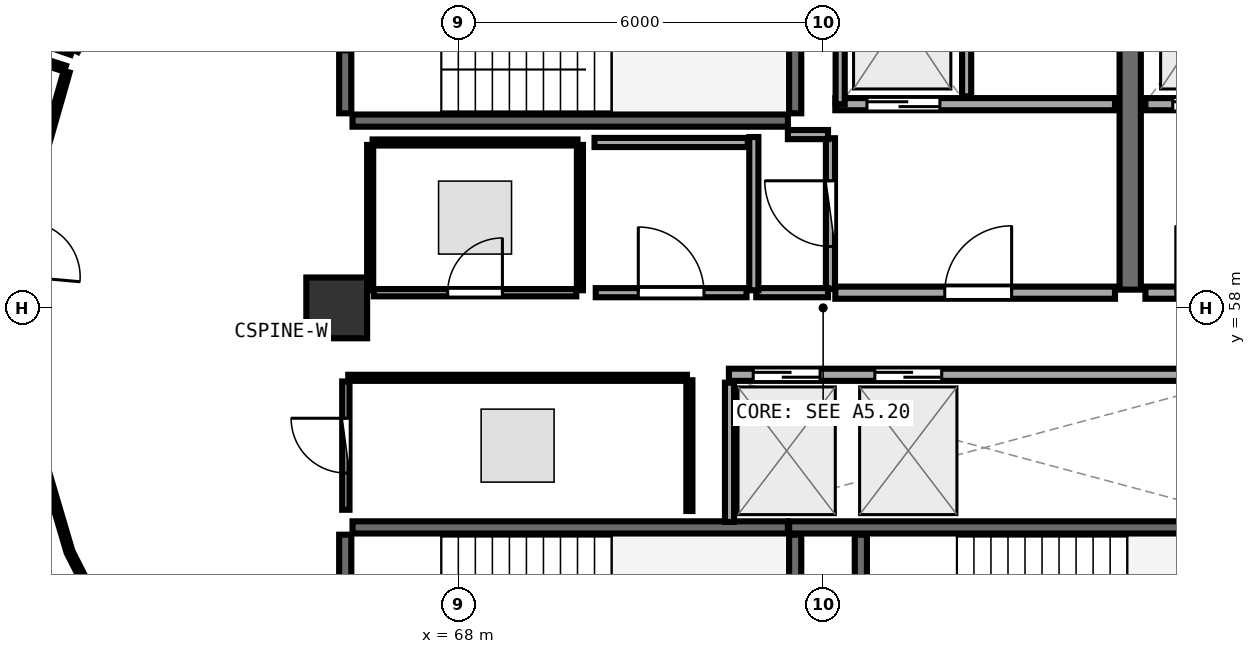
"""IFC4 building model, lengths in metres.
Left out: names, types, materials, properties, quantities, classifications, styles, units other than length and angle.
Written with IfcOpenShell. Run it as: python <this file> out.ifc"""

import sys

from ifc_helpers import new_model, si_unit, direction, frame, frame_2d, origin, origin_2d, place, context, subcontext, project, spatial, rectangle, extrude, element, fill, save


model = new_model("IFC4")
c1 = context("Model", 3, precision=1e-05, world=origin(), true_north=direction((0.0, 1.0)))
c2 = subcontext(c1, "Body", "Model", "MODEL_VIEW")
j1 = project(units=[si_unit("LENGTHUNIT", "METRE"), si_unit("PLANEANGLEUNIT", "RADIAN")], contexts=[c1])
p1 = place(None, origin())
s1 = spatial("IfcSite", under=j1, at=p1, CompositionType="ELEMENT")
p2 = place(p1, origin())
s2 = spatial("IfcBuilding", under=s1, at=p2, CompositionType="ELEMENT")
p3 = place(p2, frame((0.0, 0.0, 282.45)))
s3 = spatial("IfcBuildingStorey", under=s2, at=p3, CompositionType="ELEMENT", Elevation=282.45)
p4 = place(p3, frame((66.0, 58.0, 0.0), z_axis=(0.0, 0.0, 1.0), x_axis=(1.0, 0.0, 0.0)))
e1 = element("IfcColumn", 1, at=p4, inside=s3, PredefinedType="PILASTER", context=c2, shape_type="SweptSolid", body=[
    extrude(rectangle(XDim=1.0, YDim=1.0, at=origin_2d()), origin(), (0.0, 0.0, 1.0), 3.75),
])
p5 = place(p3, frame((66.26, 61.08, 0.0), z_axis=(0.0, 0.0, 1.0), x_axis=(1.0, 0.0, 0.0)))
e2 = element("IfcWall", 2, at=p5, inside=s3, PredefinedType="SHEAR", context=c2, shape_type="SweptSolid", body=[
    extrude(rectangle(XDim=7.16, YDim=0.2, at=frame_2d((3.58, 0.0))), origin(), (0.0, 0.0, 1.0), 3.49),
])
p6 = place(p3, frame((73.54, 61.2, 0.0), z_axis=(0.0, 0.0, 1.0), x_axis=(0.0, 1.0, 0.0)))
e3 = element("IfcWall", 3, at=p6, inside=s3, PredefinedType="SHEAR", context=c2, shape_type="SweptSolid", body=[
    extrude(rectangle(XDim=3.07, YDim=0.2, at=frame_2d((1.535, 0.0))), origin(), (0.0, 0.0, 1.0), 3.49),
])
p7 = place(p3, frame((66.14, 64.27, 0.0), z_axis=(0.0, 0.0, 1.0), x_axis=(0.0, -1.0, 0.0)))
e4 = element("IfcWall", 4, at=p7, inside=s3, PredefinedType="SHEAR", context=c2, shape_type="SweptSolid", body=[
    extrude(rectangle(XDim=3.07, YDim=0.2, at=frame_2d((1.535, 0.0))), origin(), (0.0, 0.0, 1.0), 3.49),
])
p8 = place(p7, frame((1.01, 0.0, 0.0)))
e5 = element("IfcOpeningElement", 5, at=p8, cuts=e4, PredefinedType="OPENING", context=c2, shape_type="SweptSolid", body=[
    extrude(rectangle(XDim=1.05, YDim=2.1, at=frame_2d((0.525, 1.05))), frame((0.0, 0.11, 0.0), z_axis=(0.0, -1.0, 0.0), x_axis=(1.0, 0.0, 0.0)), (0.0, 0.0, 1.0), 0.22),
])
p9 = place(p3, frame((81.9, 54.39, 0.0), z_axis=(0.0, 0.0, 1.0), x_axis=(-1.0, 0.0, 0.0)))
e6 = element("IfcWall", 6, at=p9, inside=s3, PredefinedType="SHEAR", context=c2, shape_type="SweptSolid", body=[
    extrude(rectangle(XDim=8.46, YDim=0.2, at=frame_2d((4.23, 0.0))), origin(), (0.0, 0.0, 1.0), 3.49),
])
for number, where, z_axis, x_axis in (
    (7, (74.62, 54.27, 0.0), (0.0, 0.0, 1.0), (0.0, -1.0, 0.0)),
    (8, (73.54, 51.2, 0.0), (0.0, 0.0, 1.0), (0.0, 1.0, 0.0)),
):
    element("IfcWall", number, at=place(p3, frame(where, z_axis=z_axis, x_axis=x_axis)), inside=s3, PredefinedType="SHEAR", context=c2, shape_type="SweptSolid", body=[
        extrude(rectangle(XDim=3.07, YDim=0.2, at=frame_2d((1.535, 0.0))), origin(), (0.0, 0.0, 1.0), 3.49),
    ])
p10 = place(p3, frame((73.42, 54.39, 0.0), z_axis=(0.0, 0.0, 1.0), x_axis=(-1.0, 0.0, 0.0)))
e9 = element("IfcWall", 9, at=p10, inside=s3, PredefinedType="SHEAR", context=c2, shape_type="SweptSolid", body=[
    extrude(rectangle(XDim=7.16, YDim=0.2, at=frame_2d((3.58, 0.0))), origin(), (0.0, 0.0, 1.0), 3.49),
])
p11 = place(p3, frame((66.14, 54.27, 0.0), z_axis=(0.0, 0.0, 1.0), x_axis=(0.0, -1.0, 0.0)))
e10 = element("IfcWall", 10, at=p11, inside=s3, PredefinedType="SHEAR", context=c2, shape_type="SweptSolid", body=[
    extrude(rectangle(XDim=3.07, YDim=0.2, at=frame_2d((1.535, 0.0))), origin(), (0.0, 0.0, 1.0), 3.49),
])
p12 = place(p11, frame((1.01, 0.0, 0.0)))
e11 = element("IfcOpeningElement", 11, at=p12, cuts=e10, PredefinedType="OPENING", context=c2, shape_type="SweptSolid", body=[
    extrude(rectangle(XDim=1.05, YDim=2.1, at=frame_2d((0.525, 1.05))), frame((0.0, 0.11, 0.0), z_axis=(0.0, -1.0, 0.0), x_axis=(1.0, 0.0, 0.0)), (0.0, 0.0, 1.0), 0.22),
])
p13 = place(p3, frame((79.05, 58.3, 0.0), z_axis=(0.0, 0.0, 1.0), x_axis=(0.0, 1.0, 0.0)))
e12 = element("IfcWall", 12, at=p13, inside=s3, PredefinedType="SHEAR", context=c2, shape_type="SweptSolid", body=[
    extrude(rectangle(XDim=6.3, YDim=0.35, at=frame_2d((3.15, 0.0))), origin(), (0.0, 0.0, 1.0), 3.49),
])
p14 = place(p3, frame((74.2, 61.35, 0.0), z_axis=(0.0, 0.0, 1.0), x_axis=(1.0, 0.0, 0.0)))
e13 = element("IfcWall", 13, at=p14, inside=s3, PredefinedType="SOLIDWALL", context=c2, shape_type="SweptSolid", body=[
    extrude(rectangle(XDim=4.6, YDim=0.2, at=frame_2d((2.3, 0.0))), origin(), (0.0, 0.0, 1.0), 3.48),
])
p15 = place(p14, frame((0.52, 0.0, 0.0)))
e14 = element("IfcOpeningElement", 14, at=p15, cuts=e13, PredefinedType="OPENING", context=c2, shape_type="SweptSolid", body=[
    extrude(rectangle(XDim=1.2, YDim=2.15, at=frame_2d((0.6, 1.075))), frame((0.0, 0.11, 0.0), z_axis=(0.0, -1.0, 0.0), x_axis=(1.0, 0.0, 0.0)), (0.0, 0.0, 1.0), 0.22),
])
p16 = place(p3, frame((74.28, 61.35, 0.0), z_axis=(0.0, 0.0, 1.0), x_axis=(0.0, 1.0, 0.0)))
e15 = element("IfcWall", 15, at=p16, inside=s3, PredefinedType="PARTITIONING", context=c2, shape_type="SweptSolid", body=[
    extrude(rectangle(XDim=2.97, YDim=0.15, at=frame_2d((1.485, 0.0))), origin(), (0.0, 0.0, 1.0), 3.48),
])
p17 = place(p3, frame((76.36, 61.48, 0.0), z_axis=(0.0, 0.0, 1.0), x_axis=(0.0, 1.0, 0.0)))
e16 = element("IfcWall", 16, at=p17, inside=s3, PredefinedType="PARTITIONING", context=c2, shape_type="SweptSolid", body=[
    extrude(rectangle(XDim=2.84, YDim=0.15, at=frame_2d((1.42, 0.0))), origin(), (0.0, 0.0, 1.0), 3.48),
])
p18 = place(p3, frame((79.3, 61.35, 0.0), z_axis=(0.0, 0.0, 1.0), x_axis=(1.0, 0.0, 0.0)))
e17 = element("IfcWall", 17, at=p18, inside=s3, PredefinedType="SOLIDWALL", context=c2, shape_type="SweptSolid", body=[
    extrude(rectangle(XDim=4.0, YDim=0.2, at=frame_2d((2.0, 0.0))), origin(), (0.0, 0.0, 1.0), 2.775),
])
p19 = place(p18, frame((0.45, 0.0, 0.0)))
e18 = element("IfcOpeningElement", 18, at=p19, cuts=e17, PredefinedType="OPENING", context=c2, shape_type="SweptSolid", body=[
    extrude(rectangle(XDim=1.2, YDim=2.15, at=frame_2d((0.6, 1.075))), frame((0.0, 0.11, 0.0), z_axis=(0.0, -1.0, 0.0), x_axis=(1.0, 0.0, 0.0)), (0.0, 0.0, 1.0), 0.22),
])
p20 = place(p3, frame((74.2, 58.25, 0.0), z_axis=(0.0, 0.0, 1.0), x_axis=(1.0, 0.0, 0.0)))
e19 = element("IfcWall", 19, at=p20, inside=s3, PredefinedType="SOLIDWALL", context=c2, shape_type="SweptSolid", body=[
    extrude(rectangle(XDim=4.6, YDim=0.2, at=frame_2d((2.3, 0.0))), origin(), (0.0, 0.0, 1.0), 3.48),
])
p21 = place(p20, frame((1.8, 0.0, 0.0)))
e20 = element("IfcOpeningElement", 20, at=p21, cuts=e19, PredefinedType="OPENING", context=c2, shape_type="SweptSolid", body=[
    extrude(rectangle(XDim=1.1, YDim=2.1, at=frame_2d((0.55, 1.05))), frame((0.0, 0.11, 0.0), z_axis=(0.0, -1.0, 0.0), x_axis=(1.0, 0.0, 0.0)), (0.0, 0.0, 1.0), 0.22),
])
p22 = place(p3, frame((79.3, 58.25, 0.0), z_axis=(0.0, 0.0, 1.0), x_axis=(1.0, 0.0, 0.0)))
e21 = element("IfcWall", 21, at=p22, inside=s3, PredefinedType="SOLIDWALL", context=c2, shape_type="SweptSolid", body=[
    extrude(rectangle(XDim=4.0, YDim=0.2, at=frame_2d((2.0, 0.0))), origin(), (0.0, 0.0, 1.0), 2.775),
])
p23 = place(p22, frame((0.5, 0.0, 0.0)))
e22 = element("IfcOpeningElement", 22, at=p23, cuts=e21, PredefinedType="OPENING", context=c2, shape_type="SweptSolid", body=[
    extrude(rectangle(XDim=1.1, YDim=2.1, at=frame_2d((0.55, 1.05))), frame((0.0, 0.11, 0.0), z_axis=(0.0, -1.0, 0.0), x_axis=(1.0, 0.0, 0.0)), (0.0, 0.0, 1.0), 0.22),
])
p24 = place(p3, frame((72.45, 56.9, 0.0), z_axis=(0.0, 0.0, 1.0), x_axis=(1.0, 0.0, 0.0)))
e23 = element("IfcWall", 23, at=p24, inside=s3, PredefinedType="SOLIDWALL", context=c2, shape_type="SweptSolid", body=[
    extrude(rectangle(XDim=8.4, YDim=0.2, at=frame_2d((4.2, 0.0))), origin(), (0.0, 0.0, 1.0), 3.48),
])
p25 = place(p24, frame((0.4, 0.0, 0.0)))
e24 = element("IfcOpeningElement", 24, at=p25, cuts=e23, PredefinedType="OPENING", context=c2, shape_type="SweptSolid", body=[
    extrude(rectangle(XDim=1.1, YDim=2.1, at=frame_2d((0.55, 1.05))), frame((0.0, 0.11, 0.0), z_axis=(0.0, -1.0, 0.0), x_axis=(1.0, 0.0, 0.0)), (0.0, 0.0, 1.0), 0.22),
])
p26 = place(p24, frame((2.4, 0.0, 0.0)))
e25 = element("IfcOpeningElement", 25, at=p26, cuts=e23, PredefinedType="OPENING", context=c2, shape_type="SweptSolid", body=[
    extrude(rectangle(XDim=1.1, YDim=2.1, at=frame_2d((0.55, 1.05))), frame((0.0, 0.11, 0.0), z_axis=(0.0, -1.0, 0.0), x_axis=(1.0, 0.0, 0.0)), (0.0, 0.0, 1.0), 0.22),
])
p27 = place(p3, frame((72.46, 54.48, 0.0), z_axis=(0.0, 0.0, 1.0), x_axis=(0.0, 1.0, 0.0)))
e26 = element("IfcWall", 26, at=p27, inside=s3, PredefinedType="PARTITIONING", context=c2, shape_type="SweptSolid", body=[
    extrude(rectangle(XDim=2.29, YDim=0.15, at=frame_2d((1.145, 0.0))), origin(), (0.0, 0.0, 1.0), 3.48),
])
p28 = place(p3, frame((74.12, 58.31, 0.0), z_axis=(0.0, 0.0, 1.0), x_axis=(0.0, 1.0, 0.0)))
e27 = element("IfcWall", 27, at=p28, inside=s3, PredefinedType="PARTITIONING", context=c2, shape_type="SweptSolid", body=[
    extrude(rectangle(XDim=2.48, YDim=0.15, at=frame_2d((1.24, 0.0))), origin(), (0.0, 0.0, 1.0), 3.48),
])
p29 = place(p28, frame((0.7, 0.0, 0.0)))
e28 = element("IfcOpeningElement", 28, at=p29, cuts=e27, PredefinedType="OPENING", context=c2, shape_type="SweptSolid", body=[
    extrude(rectangle(XDim=1.08, YDim=2.1, at=frame_2d((0.54, 1.05))), frame((0.0, 0.085, 0.0), z_axis=(0.0, -1.0, 0.0), x_axis=(1.0, 0.0, 0.0)), (0.0, 0.0, 1.0), 0.17),
])
p30 = place(p3, frame((66.61, 58.25, 0.0), z_axis=(0.0, 0.0, 1.0), x_axis=(1.0, 0.0, 0.0)))
e29 = element("IfcWall", 29, at=p30, inside=s3, PredefinedType="PARTITIONING", context=c2, shape_type="SweptSolid", body=[
    extrude(rectangle(XDim=3.33, YDim=0.12, at=frame_2d((1.665, 0.0))), origin(), (0.0, 0.0, 1.0), 3.48),
])
p31 = place(p30, frame((1.215, 0.0, 0.0)))
e30 = element("IfcOpeningElement", 30, at=p31, cuts=e29, PredefinedType="OPENING", context=c2, shape_type="SweptSolid", body=[
    extrude(rectangle(XDim=0.9, YDim=2.08, at=frame_2d((0.45, 1.04))), frame((0.0, 0.07, 0.0), z_axis=(0.0, -1.0, 0.0), x_axis=(1.0, 0.0, 0.0)), (0.0, 0.0, 1.0), 0.14),
])
p32 = place(p3, frame((70.26, 58.25, 0.0), z_axis=(0.0, 0.0, 1.0), x_axis=(1.0, 0.0, 0.0)))
e31 = element("IfcWall", 31, at=p32, inside=s3, PredefinedType="PARTITIONING", context=c2, shape_type="SweptSolid", body=[
    extrude(rectangle(XDim=2.48, YDim=0.15, at=frame_2d((1.24, 0.0))), origin(), (0.0, 0.0, 1.0), 3.48),
])
p33 = place(p32, frame((0.7, 0.0, 0.0)))
e32 = element("IfcOpeningElement", 32, at=p33, cuts=e31, PredefinedType="OPENING", context=c2, shape_type="SweptSolid", body=[
    extrude(rectangle(XDim=1.08, YDim=2.1, at=frame_2d((0.54, 1.05))), frame((0.0, 0.085, 0.0), z_axis=(0.0, -1.0, 0.0), x_axis=(1.0, 0.0, 0.0)), (0.0, 0.0, 1.0), 0.17),
])
p34 = place(p3, frame((66.15, 54.68, 0.0), z_axis=(0.0, 0.0, 1.0), x_axis=(0.0, 1.0, 0.0)))
e33 = element("IfcWall", 33, at=p34, inside=s3, PredefinedType="PARTITIONING", context=c2, shape_type="SweptSolid", body=[
    extrude(rectangle(XDim=2.11, YDim=0.12, at=frame_2d((1.055, 0.0))), origin(), (0.0, 0.0, 1.0), 2.775),
])
p35 = place(p34, frame((0.605, 0.0, 0.0)))
e34 = element("IfcOpeningElement", 34, at=p35, cuts=e33, PredefinedType="OPENING", context=c2, shape_type="SweptSolid", body=[
    extrude(rectangle(XDim=0.9, YDim=2.08, at=frame_2d((0.45, 1.04))), frame((0.0, 0.07, 0.0), z_axis=(0.0, -1.0, 0.0), x_axis=(1.0, 0.0, 0.0)), (0.0, 0.0, 1.0), 0.14),
])
p36 = place(p3, frame((72.9, 58.25, 0.0), z_axis=(0.0, 0.0, 1.0), x_axis=(1.0, 0.0, 0.0)))
e35 = element("IfcWall", 35, at=p36, inside=s3, PredefinedType="PARTITIONING", context=c2, shape_type="SweptSolid", body=[
    extrude(rectangle(XDim=1.18, YDim=0.15, at=frame_2d((0.59, 0.0))), origin(), (0.0, 0.0, 1.0), 3.48),
])
p37 = place(p3, frame((74.08, 60.85, 0.0), z_axis=(0.0, 0.0, 1.0), x_axis=(-1.0, 0.0, 0.0)))
e36 = element("IfcWall", 36, at=p37, inside=s3, PredefinedType="PARTITIONING", context=c2, shape_type="SweptSolid", body=[
    extrude(rectangle(XDim=0.66, YDim=0.15, at=frame_2d((0.33, 0.0))), origin(), (0.0, 0.0, 1.0), 3.48),
])
p38 = place(p3, frame((72.86, 60.81, 0.0), z_axis=(0.0, 0.0, 1.0), x_axis=(0.0, -1.0, 0.0)))
e37 = element("IfcWall", 37, at=p38, inside=s3, PredefinedType="PARTITIONING", context=c2, shape_type="SweptSolid", body=[
    extrude(rectangle(XDim=2.52, YDim=0.15, at=frame_2d((1.26, 0.0))), origin(), (0.0, 0.0, 1.0), 3.48),
])
p39 = place(p3, frame((70.0, 58.29, 0.0), z_axis=(0.0, 0.0, 1.0), x_axis=(0.0, 1.0, 0.0)))
e38 = element("IfcWall", 38, at=p39, inside=s3, PredefinedType="PARTITIONING", context=c2, shape_type="SweptSolid", body=[
    extrude(rectangle(XDim=2.39, YDim=0.1, at=frame_2d((1.195, 0.0))), origin(), (0.0, 0.0, 1.0), 3.48),
])
p40 = place(p3, frame((69.96, 60.72, 0.0), z_axis=(0.0, 0.0, 1.0), x_axis=(-1.0, 0.0, 0.0)))
e39 = element("IfcWall", 39, at=p40, inside=s3, PredefinedType="PARTITIONING", context=c2, shape_type="SweptSolid", body=[
    extrude(rectangle(XDim=3.37, YDim=0.1, at=frame_2d((1.685, 0.0))), origin(), (0.0, 0.0, 1.0), 3.48),
])
p41 = place(p3, frame((66.55, 60.68, 0.0), z_axis=(0.0, 0.0, 1.0), x_axis=(0.0, -1.0, 0.0)))
e40 = element("IfcWall", 40, at=p41, inside=s3, PredefinedType="PARTITIONING", context=c2, shape_type="SweptSolid", body=[
    extrude(rectangle(XDim=2.39, YDim=0.1, at=frame_2d((1.195, 0.0))), origin(), (0.0, 0.0, 1.0), 3.48),
])
p42 = place(p3, frame((72.76, 60.72, 0.0), z_axis=(0.0, 0.0, 1.0), x_axis=(-1.0, 0.0, 0.0)))
e41 = element("IfcWall", 41, at=p42, inside=s3, PredefinedType="PARTITIONING", context=c2, shape_type="SweptSolid", body=[
    extrude(rectangle(XDim=2.52, YDim=0.15, at=frame_2d((1.26, 0.0))), origin(), (0.0, 0.0, 1.0), 3.48),
])
p43 = place(p3, frame((71.8, 54.66, 0.0), z_axis=(0.0, 0.0, 1.0), x_axis=(0.0, 1.0, 0.0)))
e42 = element("IfcWall", 42, at=p43, inside=s3, PredefinedType="PARTITIONING", context=c2, shape_type="SweptSolid", body=[
    extrude(rectangle(XDim=2.15, YDim=0.1, at=frame_2d((1.075, 0.0))), origin(), (0.0, 0.0, 1.0), 3.48),
])
p44 = place(p3, frame((71.76, 56.85, 0.0), z_axis=(0.0, 0.0, 1.0), x_axis=(-1.0, 0.0, 0.0)))
e43 = element("IfcWall", 43, at=p44, inside=s3, PredefinedType="PARTITIONING", context=c2, shape_type="SweptSolid", body=[
    extrude(rectangle(XDim=5.57, YDim=0.1, at=frame_2d((2.785, 0.0))), origin(), (0.0, 0.0, 1.0), 2.775),
])
p45 = place(p3, frame((61.642, 62.209, 0.0), z_axis=(0.0, 0.0, 1.0), x_axis=(-0.945103281494, 0.326771766388, 0.0)))
e44 = element("IfcWall", 44, at=p45, inside=s3, PredefinedType="PARTITIONING", context=c2, shape_type="SweptSolid", body=[
    extrude(rectangle(XDim=4.604, YDim=0.1, at=frame_2d((2.302, 0.0))), origin(), (0.0, 0.0, 1.0), 3.075),
])
p46 = place(p3, frame((61.559, 61.885, 0.0), z_axis=(0.0, 0.0, 1.0), x_axis=(-0.274226302341, -0.961665188673, 0.0)))
e45 = element("IfcWall", 45, at=p46, inside=s3, PredefinedType="PARTITIONING", context=c2, shape_type="SweptSolid", body=[
    extrude(rectangle(XDim=1.955, YDim=0.1, at=frame_2d((0.978, 0.0))), origin(), (0.0, 0.0, 1.0), 3.48),
])
p47 = place(p3, frame((61.041, 55.901, 0.0), z_axis=(0.0, 0.0, 1.0), x_axis=(0.28293653612, -0.959138632591, 0.0)))
e46 = element("IfcWall", 46, at=p47, inside=s3, PredefinedType="PARTITIONING", context=c2, shape_type="SweptSolid", body=[
    extrude(rectangle(XDim=1.956, YDim=0.1, at=frame_2d((0.978, 0.0))), origin(), (0.0, 0.0, 1.0), 3.48),
])
p48 = place(p3, frame((61.624, 53.95, 0.0), z_axis=(0.0, 0.0, 1.0), x_axis=(0.453658133306, -0.891175795276, 0.0)))
e47 = element("IfcWall", 47, at=p48, inside=s3, PredefinedType="PARTITIONING", context=c2, shape_type="SweptSolid", body=[
    extrude(rectangle(XDim=1.981, YDim=0.1, at=frame_2d((0.991, 0.0))), origin(), (0.0, 0.0, 1.0), 3.235),
])
p49 = place(p3, frame((57.184, 63.329, 0.0), z_axis=(0.0, 0.0, 1.0), x_axis=(0.95227750557, -0.305233602976, 0.0)))
e48 = element("IfcWall", 48, at=p49, inside=s3, PredefinedType="PARTITIONING", context=c2, shape_type="SweptSolid", body=[
    extrude(rectangle(XDim=4.565, YDim=0.1, at=frame_2d((2.283, 0.0))), origin(), (0.0, 0.0, 1.0), 3.175),
])
p50 = place(p15, origin())
e49 = element("IfcDoor", 49, at=p50, inside=s3, OperationType="DOUBLE_DOOR_SLIDING", PredefinedType="DOOR", context=c2, shape_type="SweptSolid", body=[
    extrude(rectangle(XDim=1.2, YDim=2.15, at=frame_2d((0.6, 1.075))), frame((0.0, 0.025, 0.0), z_axis=(0.0, -1.0, 0.0), x_axis=(1.0, 0.0, 0.0)), (0.0, 0.0, 1.0), 0.05),
])
fill(e14, e49)
p51 = place(p19, origin())
e50 = element("IfcDoor", 50, at=p51, inside=s3, OperationType="DOUBLE_DOOR_SLIDING", PredefinedType="DOOR", context=c2, shape_type="SweptSolid", body=[
    extrude(rectangle(XDim=1.2, YDim=2.15, at=frame_2d((0.6, 1.075))), frame((0.0, 0.025, 0.0), z_axis=(0.0, -1.0, 0.0), x_axis=(1.0, 0.0, 0.0)), (0.0, 0.0, 1.0), 0.05),
])
fill(e18, e50)
p52 = place(p21, frame((1.1, 0.0, 0.0), z_axis=(0.0, 0.0, 1.0), x_axis=(-1.0, 0.0, 0.0)))
e51 = element("IfcDoor", 51, at=p52, inside=s3, OperationType="SINGLE_SWING_LEFT", PredefinedType="DOOR", context=c2, shape_type="SweptSolid", body=[
    extrude(rectangle(XDim=1.1, YDim=2.1, at=frame_2d((0.55, 1.05))), frame((0.0, 0.025, 0.0), z_axis=(0.0, -1.0, 0.0), x_axis=(1.0, 0.0, 0.0)), (0.0, 0.0, 1.0), 0.05),
])
fill(e20, e51)
p53 = place(p25, origin())
e52 = element("IfcDoor", 52, at=p53, inside=s3, OperationType="DOUBLE_DOOR_SLIDING", PredefinedType="DOOR", context=c2, shape_type="SweptSolid", body=[
    extrude(rectangle(XDim=1.1, YDim=2.1, at=frame_2d((0.55, 1.05))), frame((0.0, 0.025, 0.0), z_axis=(0.0, -1.0, 0.0), x_axis=(1.0, 0.0, 0.0)), (0.0, 0.0, 1.0), 0.05),
])
fill(e24, e52)
p54 = place(p26, origin())
e53 = element("IfcDoor", 53, at=p54, inside=s3, OperationType="DOUBLE_DOOR_SLIDING", PredefinedType="DOOR", context=c2, shape_type="SweptSolid", body=[
    extrude(rectangle(XDim=1.1, YDim=2.1, at=frame_2d((0.55, 1.05))), frame((0.0, 0.025, 0.0), z_axis=(0.0, -1.0, 0.0), x_axis=(1.0, 0.0, 0.0)), (0.0, 0.0, 1.0), 0.05),
])
fill(e25, e53)
p55 = place(p29, origin())
e54 = element("IfcDoor", 54, at=p55, inside=s3, OperationType="SINGLE_SWING_RIGHT", PredefinedType="DOOR", context=c2, shape_type="SweptSolid", body=[
    extrude(rectangle(XDim=1.08, YDim=2.1, at=frame_2d((0.54, 1.05))), frame((0.0, 0.025, 0.0), z_axis=(0.0, -1.0, 0.0), x_axis=(1.0, 0.0, 0.0)), (0.0, 0.0, 1.0), 0.05),
])
fill(e28, e54)
p56 = place(p31, origin())
e55 = element("IfcDoor", 55, at=p56, inside=s3, OperationType="SINGLE_SWING_RIGHT", PredefinedType="DOOR", context=c2, shape_type="SweptSolid", body=[
    extrude(rectangle(XDim=0.9, YDim=2.08, at=frame_2d((0.45, 1.04))), frame((0.0, 0.025, 0.0), z_axis=(0.0, -1.0, 0.0), x_axis=(1.0, 0.0, 0.0)), (0.0, 0.0, 1.0), 0.05),
])
fill(e30, e55)
p57 = place(p33, origin())
e56 = element("IfcDoor", 56, at=p57, inside=s3, OperationType="SINGLE_SWING_LEFT", PredefinedType="DOOR", context=c2, shape_type="SweptSolid", body=[
    extrude(rectangle(XDim=1.08, YDim=2.1, at=frame_2d((0.54, 1.05))), frame((0.0, 0.025, 0.0), z_axis=(0.0, -1.0, 0.0), x_axis=(1.0, 0.0, 0.0)), (0.0, 0.0, 1.0), 0.05),
])
fill(e32, e56)
p58 = place(p35, origin())
e57 = element("IfcDoor", 57, at=p58, inside=s3, OperationType="SINGLE_SWING_RIGHT", PredefinedType="DOOR", context=c2, shape_type="SweptSolid", body=[
    extrude(rectangle(XDim=0.9, YDim=2.08, at=frame_2d((0.45, 1.04))), frame((0.0, 0.025, 0.0), z_axis=(0.0, -1.0, 0.0), x_axis=(1.0, 0.0, 0.0)), (0.0, 0.0, 1.0), 0.05),
])
fill(e34, e57)
save(model, sys.argv[1])
